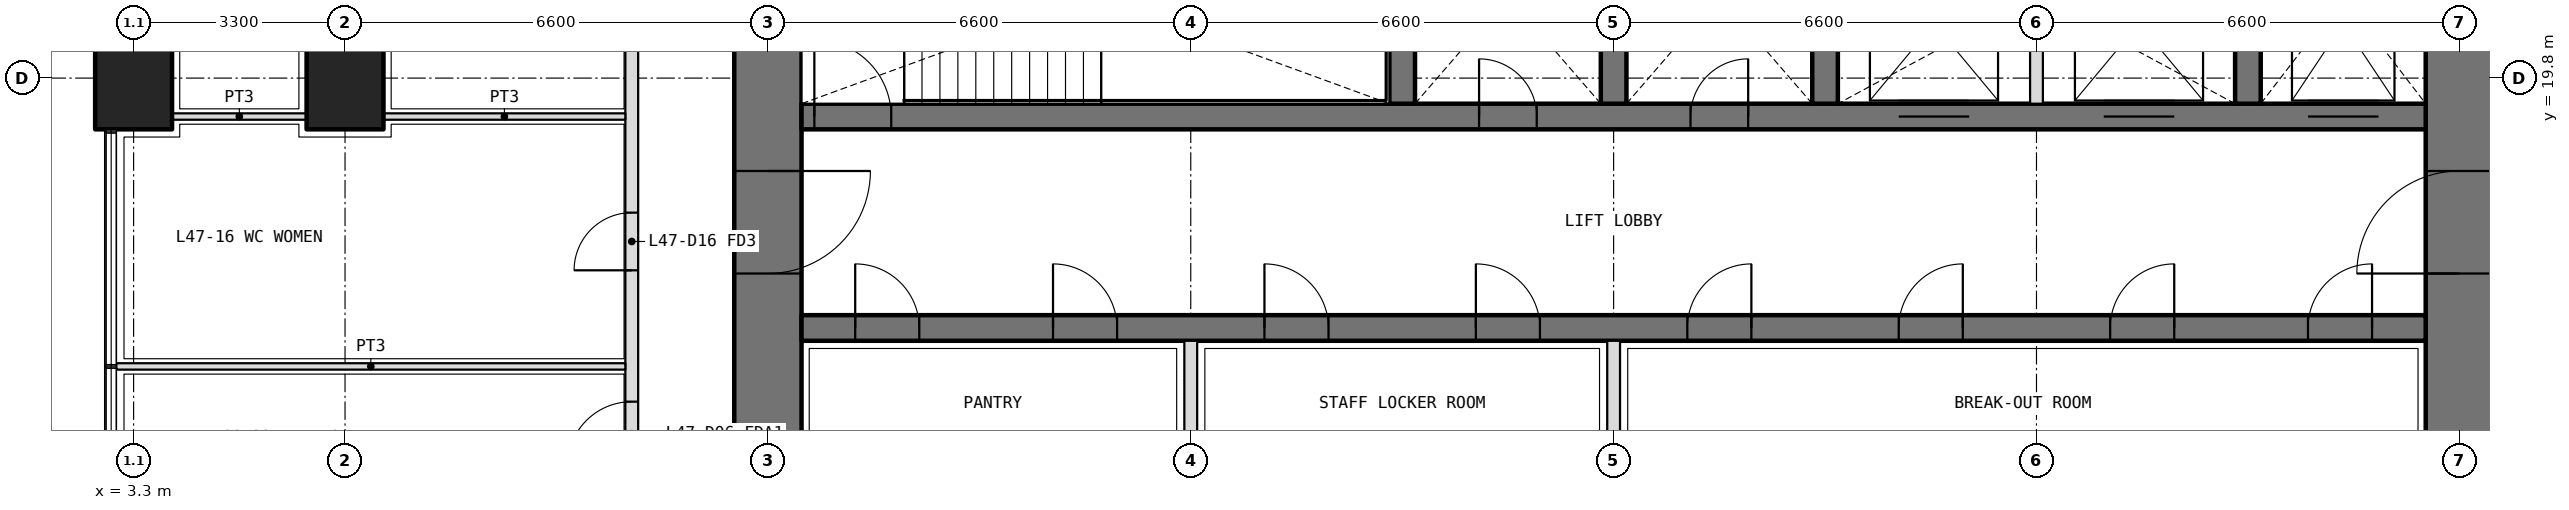
"""IFC4 building model, lengths in metres.
Left out: names, types, materials, properties, quantities, classifications, styles, units other than length and angle.
Written with IfcOpenShell. Run it as: python <this file> out.ifc"""

import sys

from ifc_helpers import new_model, si_unit, direction, frame, frame_2d, origin, origin_2d, place, context, subcontext, project, spatial, rectangle, extrude, element, fill, save


model = new_model("IFC4")
c1 = context("Model", 3, precision=1e-05, world=origin(), true_north=direction((0.0, 1.0)))
c2 = subcontext(c1, "Body", "Model", "MODEL_VIEW")
j1 = project(units=[si_unit("LENGTHUNIT", "METRE"), si_unit("PLANEANGLEUNIT", "RADIAN")], contexts=[c1])
p1 = place(None, origin())
s1 = spatial("IfcSite", under=j1, at=p1, CompositionType="ELEMENT")
p2 = place(p1, origin())
s2 = spatial("IfcBuilding", under=s1, at=p2, CompositionType="ELEMENT")
p3 = place(p2, frame((0.0, 0.0, 206.1)))
s3 = spatial("IfcBuildingStorey", under=s2, at=p3, CompositionType="ELEMENT", Elevation=206.1)
for number, where, z_axis, x_axis in (
    (1, (3.3, 19.8, 0.0), (0.0, 0.0, 1.0), (0.0, 1.0, 0.0)),
    (2, (6.6, 19.8, 0.0), (0.0, 0.0, 1.0), (0.0, 1.0, 0.0)),
):
    element("IfcColumn", number, at=place(p3, frame(where, z_axis=z_axis, x_axis=x_axis)), inside=s3, PredefinedType="COLUMN", context=c2, shape_type="SweptSolid", body=[
        extrude(rectangle(XDim=1.6, YDim=1.2, at=origin_2d()), origin(), (0.0, 0.0, 1.0), 4.2),
    ])
p4 = place(p3, frame((39.6, 13.725, 0.0), z_axis=(0.0, 0.0, 1.0), x_axis=(0.0, 1.0, 0.0)))
e3 = element("IfcWall", 3, at=p4, inside=s3, PredefinedType="SHEAR", context=c2, shape_type="SweptSolid", body=[
    extrude(rectangle(XDim=18.75, YDim=1.05, at=frame_2d((9.375, 0.0))), origin(), (0.0, 0.0, 1.0), 4.2),
])
p5 = place(p4, frame((3.025, 0.0, 0.0)))
e4 = element("IfcOpeningElement", 4, at=p5, cuts=e3, PredefinedType="OPENING", context=c2, shape_type="SweptSolid", body=[
    extrude(rectangle(XDim=1.6, YDim=2.1, at=frame_2d((0.8, 1.05))), frame((0.0, 0.535, 0.0), z_axis=(0.0, -1.0, 0.0), x_axis=(1.0, 0.0, 0.0)), (0.0, 0.0, 1.0), 1.07),
])
p6 = place(p4, frame((13.825, 0.0, 0.0)))
e5 = element("IfcOpeningElement", 5, at=p6, cuts=e3, PredefinedType="OPENING", context=c2, shape_type="SweptSolid", body=[
    extrude(rectangle(XDim=1.6, YDim=2.1, at=frame_2d((0.8, 1.05))), frame((0.0, 0.535, 0.0), z_axis=(0.0, -1.0, 0.0), x_axis=(1.0, 0.0, 0.0)), (0.0, 0.0, 1.0), 1.07),
])
p7 = place(p3, frame((13.2, 32.475, 0.0), z_axis=(0.0, 0.0, 1.0), x_axis=(0.0, -1.0, 0.0)))
e6 = element("IfcWall", 6, at=p7, inside=s3, PredefinedType="SHEAR", context=c2, shape_type="SweptSolid", body=[
    extrude(rectangle(XDim=18.75, YDim=1.05, at=frame_2d((9.375, 0.0))), origin(), (0.0, 0.0, 1.0), 4.2),
])
p8 = place(p7, frame((14.125, 0.0, 0.0)))
e7 = element("IfcOpeningElement", 7, at=p8, cuts=e6, PredefinedType="OPENING", context=c2, shape_type="SweptSolid", body=[
    extrude(rectangle(XDim=1.6, YDim=2.1, at=frame_2d((0.8, 1.05))), frame((0.0, 0.535, 0.0), z_axis=(0.0, -1.0, 0.0), x_axis=(1.0, 0.0, 0.0)), (0.0, 0.0, 1.0), 1.07),
])
p9 = place(p7, frame((3.325, 0.0, 0.0)))
e8 = element("IfcOpeningElement", 8, at=p9, cuts=e6, PredefinedType="OPENING", context=c2, shape_type="SweptSolid", body=[
    extrude(rectangle(XDim=1.6, YDim=2.1, at=frame_2d((0.8, 1.05))), frame((0.0, 0.535, 0.0), z_axis=(0.0, -1.0, 0.0), x_axis=(1.0, 0.0, 0.0)), (0.0, 0.0, 1.0), 1.07),
])
p10 = place(p3, frame((13.725, 15.9, 0.0), z_axis=(0.0, 0.0, 1.0), x_axis=(1.0, 0.0, 0.0)))
e9 = element("IfcWall", 9, at=p10, inside=s3, PredefinedType="SHEAR", context=c2, shape_type="SweptSolid", body=[
    extrude(rectangle(XDim=25.35, YDim=0.4, at=frame_2d((12.675, 0.0))), origin(), (0.0, 0.0, 1.0), 4.2),
])
p11 = place(p10, frame((0.837, 0.0, 0.0)))
e10 = element("IfcOpeningElement", 10, at=p11, cuts=e9, PredefinedType="OPENING", context=c2, shape_type="SweptSolid", body=[
    extrude(rectangle(XDim=1.0, YDim=2.1, at=frame_2d((0.5, 1.05))), frame((0.0, 0.21, 0.0), z_axis=(0.0, -1.0, 0.0), x_axis=(1.0, 0.0, 0.0)), (0.0, 0.0, 1.0), 0.42),
])
p12 = place(p10, frame((3.925, 0.0, 0.0)))
e11 = element("IfcOpeningElement", 11, at=p12, cuts=e9, PredefinedType="OPENING", context=c2, shape_type="SweptSolid", body=[
    extrude(rectangle(XDim=1.0, YDim=2.1, at=frame_2d((0.5, 1.05))), frame((0.0, 0.21, 0.0), z_axis=(0.0, -1.0, 0.0), x_axis=(1.0, 0.0, 0.0)), (0.0, 0.0, 1.0), 0.42),
])
p13 = place(p10, frame((7.225, 0.0, 0.0)))
e12 = element("IfcOpeningElement", 12, at=p13, cuts=e9, PredefinedType="OPENING", context=c2, shape_type="SweptSolid", body=[
    extrude(rectangle(XDim=1.0, YDim=2.1, at=frame_2d((0.5, 1.05))), frame((0.0, 0.21, 0.0), z_axis=(0.0, -1.0, 0.0), x_axis=(1.0, 0.0, 0.0)), (0.0, 0.0, 1.0), 0.42),
])
p14 = place(p10, frame((10.525, 0.0, 0.0)))
e13 = element("IfcOpeningElement", 13, at=p14, cuts=e9, PredefinedType="OPENING", context=c2, shape_type="SweptSolid", body=[
    extrude(rectangle(XDim=1.0, YDim=2.1, at=frame_2d((0.5, 1.05))), frame((0.0, 0.21, 0.0), z_axis=(0.0, -1.0, 0.0), x_axis=(1.0, 0.0, 0.0)), (0.0, 0.0, 1.0), 0.42),
])
p15 = place(p10, frame((13.825, 0.0, 0.0)))
e14 = element("IfcOpeningElement", 14, at=p15, cuts=e9, PredefinedType="OPENING", context=c2, shape_type="SweptSolid", body=[
    extrude(rectangle(XDim=1.0, YDim=2.1, at=frame_2d((0.5, 1.05))), frame((0.0, 0.21, 0.0), z_axis=(0.0, -1.0, 0.0), x_axis=(1.0, 0.0, 0.0)), (0.0, 0.0, 1.0), 0.42),
])
p16 = place(p10, frame((17.125, 0.0, 0.0)))
e15 = element("IfcOpeningElement", 15, at=p16, cuts=e9, PredefinedType="OPENING", context=c2, shape_type="SweptSolid", body=[
    extrude(rectangle(XDim=1.0, YDim=2.1, at=frame_2d((0.5, 1.05))), frame((0.0, 0.21, 0.0), z_axis=(0.0, -1.0, 0.0), x_axis=(1.0, 0.0, 0.0)), (0.0, 0.0, 1.0), 0.42),
])
p17 = place(p10, frame((20.425, 0.0, 0.0)))
e16 = element("IfcOpeningElement", 16, at=p17, cuts=e9, PredefinedType="OPENING", context=c2, shape_type="SweptSolid", body=[
    extrude(rectangle(XDim=1.0, YDim=2.1, at=frame_2d((0.5, 1.05))), frame((0.0, 0.21, 0.0), z_axis=(0.0, -1.0, 0.0), x_axis=(1.0, 0.0, 0.0)), (0.0, 0.0, 1.0), 0.42),
])
p18 = place(p10, frame((23.512, 0.0, 0.0)))
e17 = element("IfcOpeningElement", 17, at=p18, cuts=e9, PredefinedType="OPENING", context=c2, shape_type="SweptSolid", body=[
    extrude(rectangle(XDim=1.0, YDim=2.1, at=frame_2d((0.5, 1.05))), frame((0.0, 0.21, 0.0), z_axis=(0.0, -1.0, 0.0), x_axis=(1.0, 0.0, 0.0)), (0.0, 0.0, 1.0), 0.42),
])
p19 = place(p3, frame((13.725, 19.2, 0.0), z_axis=(0.0, 0.0, 1.0), x_axis=(1.0, 0.0, 0.0)))
e18 = element("IfcWall", 18, at=p19, inside=s3, PredefinedType="SHEAR", context=c2, shape_type="SweptSolid", body=[
    extrude(rectangle(XDim=25.35, YDim=0.4, at=frame_2d((12.675, 0.0))), origin(), (0.0, 0.0, 1.0), 4.2),
])
p20 = place(p19, frame((10.575, 0.0, 0.0)))
e19 = element("IfcOpeningElement", 19, at=p20, cuts=e18, PredefinedType="OPENING", context=c2, shape_type="SweptSolid", body=[
    extrude(rectangle(XDim=0.9, YDim=2.1, at=frame_2d((0.45, 1.05))), frame((0.0, 0.21, 0.0), z_axis=(0.0, -1.0, 0.0), x_axis=(1.0, 0.0, 0.0)), (0.0, 0.0, 1.0), 0.42),
])
p21 = place(p19, frame((13.875, 0.0, 0.0)))
e20 = element("IfcOpeningElement", 20, at=p21, cuts=e18, PredefinedType="OPENING", context=c2, shape_type="SweptSolid", body=[
    extrude(rectangle(XDim=0.9, YDim=2.1, at=frame_2d((0.45, 1.05))), frame((0.0, 0.21, 0.0), z_axis=(0.0, -1.0, 0.0), x_axis=(1.0, 0.0, 0.0)), (0.0, 0.0, 1.0), 0.42),
])
p22 = place(p19, frame((0.2, 0.0, 0.0)))
e21 = element("IfcOpeningElement", 21, at=p22, cuts=e18, PredefinedType="OPENING", context=c2, shape_type="SweptSolid", body=[
    extrude(rectangle(XDim=1.2, YDim=2.1, at=frame_2d((0.6, 1.05))), frame((0.0, 0.21, 0.0), z_axis=(0.0, -1.0, 0.0), x_axis=(1.0, 0.0, 0.0)), (0.0, 0.0, 1.0), 0.42),
])
p23 = place(p19, frame((23.512, 0.0, 0.0)))
e22 = element("IfcOpeningElement", 22, at=p23, cuts=e18, PredefinedType="OPENING", context=c2, shape_type="SweptSolid", body=[
    extrude(rectangle(XDim=1.1, YDim=2.1, at=frame_2d((0.55, 1.05))), frame((0.0, 0.21, 0.0), z_axis=(0.0, -1.0, 0.0), x_axis=(1.0, 0.0, 0.0)), (0.0, 0.0, 1.0), 0.42),
])
p24 = place(p19, frame((17.125, 0.0, 0.0)))
e23 = element("IfcOpeningElement", 23, at=p24, cuts=e18, PredefinedType="OPENING", context=c2, shape_type="SweptSolid", body=[
    extrude(rectangle(XDim=1.1, YDim=2.1, at=frame_2d((0.55, 1.05))), frame((0.0, 0.21, 0.0), z_axis=(0.0, -1.0, 0.0), x_axis=(1.0, 0.0, 0.0)), (0.0, 0.0, 1.0), 0.42),
])
p25 = place(p19, frame((20.325, 0.0, 0.0)))
e24 = element("IfcOpeningElement", 24, at=p25, cuts=e18, PredefinedType="OPENING", context=c2, shape_type="SweptSolid", body=[
    extrude(rectangle(XDim=1.1, YDim=2.1, at=frame_2d((0.55, 1.05))), frame((0.0, 0.21, 0.0), z_axis=(0.0, -1.0, 0.0), x_axis=(1.0, 0.0, 0.0)), (0.0, 0.0, 1.0), 0.42),
])
for number, where, z_axis, x_axis in (
    (25, (23.1, 19.4, 0.0), (0.0, 0.0, 1.0), (0.0, 1.0, 0.0)),
    (26, (26.4, 19.4, 0.0), (0.0, 0.0, 1.0), (0.0, 1.0, 0.0)),
    (27, (29.7, 19.4, 0.0), (0.0, 0.0, 1.0), (0.0, 1.0, 0.0)),
    (28, (36.3, 19.4, 0.0), (0.0, 0.0, 1.0), (0.0, 1.0, 0.0)),
):
    element("IfcWall", number, at=place(p3, frame(where, z_axis=z_axis, x_axis=x_axis)), inside=s3, PredefinedType="SHEAR", context=c2, shape_type="SweptSolid", body=[
        extrude(rectangle(XDim=3.35, YDim=0.4, at=frame_2d((1.675, 0.0))), origin(), (0.0, 0.0, 1.0), 4.2),
    ])
for number, where, z_axis, x_axis in (
    (29, (19.8, 13.725, 0.0), (0.0, 0.0, 1.0), (0.0, 1.0, 0.0)),
    (30, (26.4, 13.725, 0.0), (0.0, 0.0, 1.0), (0.0, 1.0, 0.0)),
):
    element("IfcWall", number, at=place(p3, frame(where, z_axis=z_axis, x_axis=x_axis)), inside=s3, PredefinedType="PARTITIONING", context=c2, shape_type="SweptSolid", body=[
        extrude(rectangle(XDim=1.975, YDim=0.2, at=frame_2d((0.987, 0.0))), origin(), (0.0, 0.0, 1.0), 4.2),
    ])
p26 = place(p3, frame((33.0, 19.4, 0.0), z_axis=(0.0, 0.0, 1.0), x_axis=(0.0, 1.0, 0.0)))
e31 = element("IfcWall", 31, at=p26, inside=s3, PredefinedType="PARTITIONING", context=c2, shape_type="SweptSolid", body=[
    extrude(rectangle(XDim=3.35, YDim=0.2, at=frame_2d((1.675, 0.0))), origin(), (0.0, 0.0, 1.0), 4.2),
])
p27 = place(p3, frame((11.075, 11.175, 0.0), z_axis=(0.0, 0.0, 1.0), x_axis=(0.0, 1.0, 0.0)))
e32 = element("IfcWall", 32, at=p27, inside=s3, PredefinedType="PARTITIONING", context=c2, shape_type="SweptSolid", body=[
    extrude(rectangle(XDim=18.525, YDim=0.2, at=frame_2d((9.262, 0.0))), origin(), (0.0, 0.0, 1.0), 2.85),
])
p28 = place(p27, frame((0.363, 0.0, 0.0)))
e33 = element("IfcOpeningElement", 33, at=p28, cuts=e32, PredefinedType="OPENING", context=c2, shape_type="SweptSolid", body=[
    extrude(rectangle(XDim=1.2, YDim=2.1, at=frame_2d((0.6, 1.05))), frame((0.0, 0.11, 0.0), z_axis=(0.0, -1.0, 0.0), x_axis=(1.0, 0.0, 0.0)), (0.0, 0.0, 1.0), 0.22),
])
p29 = place(p27, frame((2.575, 0.0, 0.0)))
e34 = element("IfcOpeningElement", 34, at=p29, cuts=e32, PredefinedType="OPENING", context=c2, shape_type="SweptSolid", body=[
    extrude(rectangle(XDim=1.0, YDim=2.1, at=frame_2d((0.5, 1.05))), frame((0.0, 0.11, 0.0), z_axis=(0.0, -1.0, 0.0), x_axis=(1.0, 0.0, 0.0)), (0.0, 0.0, 1.0), 0.22),
])
p30 = place(p27, frame((5.625, 0.0, 0.0)))
e35 = element("IfcOpeningElement", 35, at=p30, cuts=e32, PredefinedType="OPENING", context=c2, shape_type="SweptSolid", body=[
    extrude(rectangle(XDim=0.9, YDim=2.1, at=frame_2d((0.45, 1.05))), frame((0.0, 0.11, 0.0), z_axis=(0.0, -1.0, 0.0), x_axis=(1.0, 0.0, 0.0)), (0.0, 0.0, 1.0), 0.22),
])
p31 = place(p27, frame((9.425, 0.0, 0.0)))
e36 = element("IfcOpeningElement", 36, at=p31, cuts=e32, PredefinedType="OPENING", context=c2, shape_type="SweptSolid", body=[
    extrude(rectangle(XDim=0.9, YDim=2.1, at=frame_2d((0.45, 1.05))), frame((0.0, 0.11, 0.0), z_axis=(0.0, -1.0, 0.0), x_axis=(1.0, 0.0, 0.0)), (0.0, 0.0, 1.0), 0.22),
])
p32 = place(p27, frame((12.975, 0.0, 0.0)))
e37 = element("IfcOpeningElement", 37, at=p32, cuts=e32, PredefinedType="OPENING", context=c2, shape_type="SweptSolid", body=[
    extrude(rectangle(XDim=1.0, YDim=2.1, at=frame_2d((0.5, 1.05))), frame((0.0, 0.11, 0.0), z_axis=(0.0, -1.0, 0.0), x_axis=(1.0, 0.0, 0.0)), (0.0, 0.0, 1.0), 0.22),
])
p33 = place(p27, frame((16.275, 0.0, 0.0)))
e38 = element("IfcOpeningElement", 38, at=p33, cuts=e32, PredefinedType="OPENING", context=c2, shape_type="SweptSolid", body=[
    extrude(rectangle(XDim=1.2, YDim=2.1, at=frame_2d((0.6, 1.05))), frame((0.0, 0.11, 0.0), z_axis=(0.0, -1.0, 0.0), x_axis=(1.0, 0.0, 0.0)), (0.0, 0.0, 1.0), 0.22),
])
p34 = place(p3, frame((3.03, 15.3, 0.0), z_axis=(0.0, 0.0, 1.0), x_axis=(1.0, 0.0, 0.0)))
e39 = element("IfcWall", 39, at=p34, inside=s3, PredefinedType="PARTITIONING", context=c2, shape_type="SweptSolid", body=[
    extrude(rectangle(XDim=7.945, YDim=0.1, at=frame_2d((3.973, 0.0))), origin(), (0.0, 0.0, 1.0), 2.7),
])
p35 = place(p3, frame((3.9, 19.2, 0.0), z_axis=(0.0, 0.0, 1.0), x_axis=(1.0, 0.0, 0.0)))
e40 = element("IfcWall", 40, at=p35, inside=s3, PredefinedType="PARTITIONING", context=c2, shape_type="SweptSolid", body=[
    extrude(rectangle(XDim=2.1, YDim=0.1, at=frame_2d((1.05, 0.0))), origin(), (0.0, 0.0, 1.0), 2.85),
])
p36 = place(p3, frame((7.2, 19.2, 0.0), z_axis=(0.0, 0.0, 1.0), x_axis=(1.0, 0.0, 0.0)))
e41 = element("IfcWall", 41, at=p36, inside=s3, PredefinedType="PARTITIONING", context=c2, shape_type="SweptSolid", body=[
    extrude(rectangle(XDim=3.775, YDim=0.1, at=frame_2d((1.888, 0.0))), origin(), (0.0, 0.0, 1.0), 2.85),
])
p37 = place(p29, origin())
e42 = element("IfcDoor", 42, at=p37, inside=s3, OperationType="SINGLE_SWING_LEFT", PredefinedType="DOOR", context=c2, shape_type="SweptSolid", body=[
    extrude(rectangle(XDim=1.0, YDim=2.1, at=frame_2d((0.5, 1.05))), frame((0.0, 0.025, 0.0), z_axis=(0.0, -1.0, 0.0), x_axis=(1.0, 0.0, 0.0)), (0.0, 0.0, 1.0), 0.05),
])
fill(e34, e42)
p38 = place(p30, origin())
e43 = element("IfcDoor", 43, at=p38, inside=s3, OperationType="SINGLE_SWING_LEFT", PredefinedType="DOOR", context=c2, shape_type="SweptSolid", body=[
    extrude(rectangle(XDim=0.9, YDim=2.1, at=frame_2d((0.45, 1.05))), frame((0.0, 0.025, 0.0), z_axis=(0.0, -1.0, 0.0), x_axis=(1.0, 0.0, 0.0)), (0.0, 0.0, 1.0), 0.05),
])
fill(e35, e43)
p39 = place(p20, origin())
e44 = element("IfcDoor", 44, at=p39, inside=s3, OperationType="SINGLE_SWING_LEFT", PredefinedType="DOOR", context=c2, shape_type="SweptSolid", body=[
    extrude(rectangle(XDim=0.9, YDim=2.1, at=frame_2d((0.45, 1.05))), frame((0.0, 0.025, 0.0), z_axis=(0.0, -1.0, 0.0), x_axis=(1.0, 0.0, 0.0)), (0.0, 0.0, 1.0), 0.05),
])
fill(e19, e44)
p40 = place(p21, origin())
e45 = element("IfcDoor", 45, at=p40, inside=s3, OperationType="SINGLE_SWING_RIGHT", PredefinedType="DOOR", context=c2, shape_type="SweptSolid", body=[
    extrude(rectangle(XDim=0.9, YDim=2.1, at=frame_2d((0.45, 1.05))), frame((0.0, 0.025, 0.0), z_axis=(0.0, -1.0, 0.0), x_axis=(1.0, 0.0, 0.0)), (0.0, 0.0, 1.0), 0.05),
])
fill(e20, e45)
p41 = place(p11, origin())
e46 = element("IfcDoor", 46, at=p41, inside=s3, OperationType="SINGLE_SWING_LEFT", PredefinedType="DOOR", context=c2, shape_type="SweptSolid", body=[
    extrude(rectangle(XDim=1.0, YDim=2.1, at=frame_2d((0.5, 1.05))), frame((0.0, 0.025, 0.0), z_axis=(0.0, -1.0, 0.0), x_axis=(1.0, 0.0, 0.0)), (0.0, 0.0, 1.0), 0.05),
])
fill(e10, e46)
p42 = place(p12, origin())
e47 = element("IfcDoor", 47, at=p42, inside=s3, OperationType="SINGLE_SWING_LEFT", PredefinedType="DOOR", context=c2, shape_type="SweptSolid", body=[
    extrude(rectangle(XDim=1.0, YDim=2.1, at=frame_2d((0.5, 1.05))), frame((0.0, 0.025, 0.0), z_axis=(0.0, -1.0, 0.0), x_axis=(1.0, 0.0, 0.0)), (0.0, 0.0, 1.0), 0.05),
])
fill(e11, e47)
p43 = place(p13, origin())
e48 = element("IfcDoor", 48, at=p43, inside=s3, OperationType="SINGLE_SWING_LEFT", PredefinedType="DOOR", context=c2, shape_type="SweptSolid", body=[
    extrude(rectangle(XDim=1.0, YDim=2.1, at=frame_2d((0.5, 1.05))), frame((0.0, 0.025, 0.0), z_axis=(0.0, -1.0, 0.0), x_axis=(1.0, 0.0, 0.0)), (0.0, 0.0, 1.0), 0.05),
])
fill(e12, e48)
p44 = place(p14, origin())
e49 = element("IfcDoor", 49, at=p44, inside=s3, OperationType="SINGLE_SWING_LEFT", PredefinedType="DOOR", context=c2, shape_type="SweptSolid", body=[
    extrude(rectangle(XDim=1.0, YDim=2.1, at=frame_2d((0.5, 1.05))), frame((0.0, 0.025, 0.0), z_axis=(0.0, -1.0, 0.0), x_axis=(1.0, 0.0, 0.0)), (0.0, 0.0, 1.0), 0.05),
])
fill(e13, e49)
p45 = place(p15, origin())
e50 = element("IfcDoor", 50, at=p45, inside=s3, OperationType="SINGLE_SWING_RIGHT", PredefinedType="DOOR", context=c2, shape_type="SweptSolid", body=[
    extrude(rectangle(XDim=1.0, YDim=2.1, at=frame_2d((0.5, 1.05))), frame((0.0, 0.025, 0.0), z_axis=(0.0, -1.0, 0.0), x_axis=(1.0, 0.0, 0.0)), (0.0, 0.0, 1.0), 0.05),
])
fill(e14, e50)
p46 = place(p16, origin())
e51 = element("IfcDoor", 51, at=p46, inside=s3, OperationType="SINGLE_SWING_RIGHT", PredefinedType="DOOR", context=c2, shape_type="SweptSolid", body=[
    extrude(rectangle(XDim=1.0, YDim=2.1, at=frame_2d((0.5, 1.05))), frame((0.0, 0.025, 0.0), z_axis=(0.0, -1.0, 0.0), x_axis=(1.0, 0.0, 0.0)), (0.0, 0.0, 1.0), 0.05),
])
fill(e15, e51)
p47 = place(p17, origin())
e52 = element("IfcDoor", 52, at=p47, inside=s3, OperationType="SINGLE_SWING_RIGHT", PredefinedType="DOOR", context=c2, shape_type="SweptSolid", body=[
    extrude(rectangle(XDim=1.0, YDim=2.1, at=frame_2d((0.5, 1.05))), frame((0.0, 0.025, 0.0), z_axis=(0.0, -1.0, 0.0), x_axis=(1.0, 0.0, 0.0)), (0.0, 0.0, 1.0), 0.05),
])
fill(e16, e52)
p48 = place(p18, origin())
e53 = element("IfcDoor", 53, at=p48, inside=s3, OperationType="SINGLE_SWING_RIGHT", PredefinedType="DOOR", context=c2, shape_type="SweptSolid", body=[
    extrude(rectangle(XDim=1.0, YDim=2.1, at=frame_2d((0.5, 1.05))), frame((0.0, 0.025, 0.0), z_axis=(0.0, -1.0, 0.0), x_axis=(1.0, 0.0, 0.0)), (0.0, 0.0, 1.0), 0.05),
])
fill(e17, e53)
p49 = place(p22, origin())
e54 = element("IfcDoor", 54, at=p49, inside=s3, OperationType="SINGLE_SWING_LEFT", PredefinedType="DOOR", context=c2, shape_type="SweptSolid", body=[
    extrude(rectangle(XDim=1.2, YDim=2.1, at=frame_2d((0.6, 1.05))), frame((0.0, 0.025, 0.0), z_axis=(0.0, -1.0, 0.0), x_axis=(1.0, 0.0, 0.0)), (0.0, 0.0, 1.0), 0.05),
])
fill(e21, e54)
p50 = place(p8, origin())
e55 = element("IfcDoor", 55, at=p50, inside=s3, OperationType="DOUBLE_DOOR_DOUBLE_SWING", PredefinedType="DOOR", context=c2, shape_type="SweptSolid", body=[
    extrude(rectangle(XDim=1.6, YDim=2.1, at=frame_2d((0.8, 1.05))), frame((0.0, 0.025, 0.0), z_axis=(0.0, -1.0, 0.0), x_axis=(1.0, 0.0, 0.0)), (0.0, 0.0, 1.0), 0.05),
])
fill(e7, e55)
p51 = place(p5, origin())
e56 = element("IfcDoor", 56, at=p51, inside=s3, OperationType="DOUBLE_DOOR_DOUBLE_SWING", PredefinedType="DOOR", context=c2, shape_type="SweptSolid", body=[
    extrude(rectangle(XDim=1.6, YDim=2.1, at=frame_2d((0.8, 1.05))), frame((0.0, 0.025, 0.0), z_axis=(0.0, -1.0, 0.0), x_axis=(1.0, 0.0, 0.0)), (0.0, 0.0, 1.0), 0.05),
])
fill(e4, e56)
p52 = place(p23, origin())
e57 = element("IfcDoor", 57, at=p52, inside=s3, OperationType="DOUBLE_DOOR_SLIDING", PredefinedType="DOOR", context=c2, shape_type="SweptSolid", body=[
    extrude(rectangle(XDim=1.1, YDim=2.1, at=frame_2d((0.55, 1.05))), frame((0.0, 0.025, 0.0), z_axis=(0.0, -1.0, 0.0), x_axis=(1.0, 0.0, 0.0)), (0.0, 0.0, 1.0), 0.05),
])
fill(e22, e57)
p53 = place(p24, origin())
e58 = element("IfcDoor", 58, at=p53, inside=s3, OperationType="DOUBLE_DOOR_SLIDING", PredefinedType="DOOR", context=c2, shape_type="SweptSolid", body=[
    extrude(rectangle(XDim=1.1, YDim=2.1, at=frame_2d((0.55, 1.05))), frame((0.0, 0.025, 0.0), z_axis=(0.0, -1.0, 0.0), x_axis=(1.0, 0.0, 0.0)), (0.0, 0.0, 1.0), 0.05),
])
fill(e23, e58)
p54 = place(p25, origin())
e59 = element("IfcDoor", 59, at=p54, inside=s3, OperationType="DOUBLE_DOOR_SLIDING", PredefinedType="DOOR", context=c2, shape_type="SweptSolid", body=[
    extrude(rectangle(XDim=1.1, YDim=2.1, at=frame_2d((0.55, 1.05))), frame((0.0, 0.025, 0.0), z_axis=(0.0, -1.0, 0.0), x_axis=(1.0, 0.0, 0.0)), (0.0, 0.0, 1.0), 0.05),
])
fill(e24, e59)
save(model, sys.argv[1])
